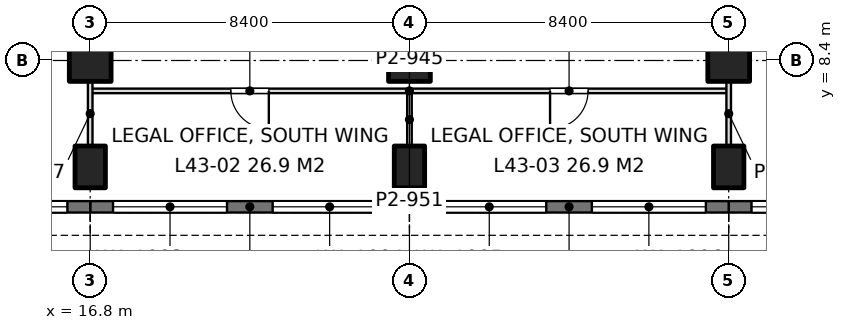
"""IFC4 building model, lengths in metres.
Left out: names, types, materials, properties, quantities, classifications, styles, units other than length and angle.
Written with IfcOpenShell. Run it as: python <this file> out.ifc"""

import sys

from ifc_helpers import new_model, si_unit, direction, frame, frame_2d, origin, origin_2d, place, context, subcontext, project, spatial, rectangle, extrude, element, fill, save


model = new_model("IFC4")
c1 = context("Model", 3, precision=1e-05, world=origin(), true_north=direction((0.0, 1.0)))
c2 = subcontext(c1, "Body", "Model", "MODEL_VIEW")
j1 = project(units=[si_unit("LENGTHUNIT", "METRE"), si_unit("PLANEANGLEUNIT", "RADIAN")], contexts=[c1])
p1 = place(None, origin())
s1 = spatial("IfcSite", under=j1, at=p1, CompositionType="ELEMENT")
p2 = place(p1, origin())
s2 = spatial("IfcBuilding", under=s1, at=p2, CompositionType="ELEMENT")
p3 = place(p2, frame((0.0, 0.0, 190.2)))
s3 = spatial("IfcBuildingStorey", under=s2, at=p3, CompositionType="ELEMENT", Elevation=190.2)
p4 = place(p3, frame((16.8, 5.6, 0.0), z_axis=(0.0, 0.0, 1.0), x_axis=(1.0, 0.0, 0.0)))
e1 = element("IfcColumn", 1, at=p4, inside=s3, PredefinedType="COLUMN", context=c2, shape_type="SweptSolid", body=[
    extrude(rectangle(XDim=0.8, YDim=1.1, at=origin_2d()), origin(), (0.0, 0.0, 1.0), 4.2),
])
p5 = place(p3, frame((16.8, 8.4, 0.0), z_axis=(0.0, 0.0, 1.0), x_axis=(1.0, 0.0, 0.0)))
e2 = element("IfcColumn", 2, at=p5, inside=s3, PredefinedType="COLUMN", context=c2, shape_type="SweptSolid", body=[
    extrude(rectangle(XDim=1.1, YDim=1.1, at=origin_2d()), origin(), (0.0, 0.0, 1.0), 4.2),
])
p6 = place(p3, frame((25.2, 5.6, 0.0), z_axis=(0.0, 0.0, 1.0), x_axis=(1.0, 0.0, 0.0)))
e3 = element("IfcColumn", 3, at=p6, inside=s3, PredefinedType="COLUMN", context=c2, shape_type="SweptSolid", body=[
    extrude(rectangle(XDim=0.8, YDim=1.1, at=origin_2d()), origin(), (0.0, 0.0, 1.0), 4.2),
])
p7 = place(p3, frame((25.2, 8.4, 0.0), z_axis=(0.0, 0.0, 1.0), x_axis=(1.0, 0.0, 0.0)))
e4 = element("IfcColumn", 4, at=p7, inside=s3, PredefinedType="COLUMN", context=c2, shape_type="SweptSolid", body=[
    extrude(rectangle(XDim=1.1, YDim=1.1, at=origin_2d()), origin(), (0.0, 0.0, 1.0), 4.2),
])
p8 = place(p3, frame((33.6, 5.6, 0.0), z_axis=(0.0, 0.0, 1.0), x_axis=(1.0, 0.0, 0.0)))
e5 = element("IfcColumn", 5, at=p8, inside=s3, PredefinedType="COLUMN", context=c2, shape_type="SweptSolid", body=[
    extrude(rectangle(XDim=0.8, YDim=1.1, at=origin_2d()), origin(), (0.0, 0.0, 1.0), 4.2),
])
p9 = place(p3, frame((33.6, 8.4, 0.0), z_axis=(0.0, 0.0, 1.0), x_axis=(1.0, 0.0, 0.0)))
e6 = element("IfcColumn", 6, at=p9, inside=s3, PredefinedType="COLUMN", context=c2, shape_type="SweptSolid", body=[
    extrude(rectangle(XDim=1.1, YDim=1.1, at=origin_2d()), origin(), (0.0, 0.0, 1.0), 4.2),
])
p10 = place(p3, frame((42.0, 4.55, 0.0), z_axis=(0.0, 0.0, 1.0), x_axis=(-1.0, 0.0, 0.0)))
e7 = element("IfcWall", 7, at=p10, inside=s3, PredefinedType="SOLIDWALL", context=c2, shape_type="SweptSolid", body=[
    extrude(rectangle(XDim=8.4, YDim=0.3, at=frame_2d((4.2, 0.0))), origin(), (0.0, 0.0, 1.0), 4.05),
])
p11 = place(p10, frame((0.6, 0.0, 0.9)))
e8 = element("IfcOpeningElement", 8, at=p11, cuts=e7, PredefinedType="OPENING", context=c2, shape_type="SweptSolid", body=[
    extrude(rectangle(XDim=3.0, YDim=1.9, at=frame_2d((1.5, 0.95))), frame((0.0, 0.16, 0.0), z_axis=(0.0, -1.0, 0.0), x_axis=(1.0, 0.0, 0.0)), (0.0, 0.0, 1.0), 0.32),
])
p12 = place(p10, frame((4.8, 0.0, 0.9)))
e9 = element("IfcOpeningElement", 9, at=p12, cuts=e7, PredefinedType="OPENING", context=c2, shape_type="SweptSolid", body=[
    extrude(rectangle(XDim=3.0, YDim=1.9, at=frame_2d((1.5, 0.95))), frame((0.0, 0.16, 0.0), z_axis=(0.0, -1.0, 0.0), x_axis=(1.0, 0.0, 0.0)), (0.0, 0.0, 1.0), 0.32),
])
p13 = place(p3, frame((33.6, 4.55, 0.0), z_axis=(0.0, 0.0, 1.0), x_axis=(-1.0, 0.0, 0.0)))
e10 = element("IfcWall", 10, at=p13, inside=s3, PredefinedType="SOLIDWALL", context=c2, shape_type="SweptSolid", body=[
    extrude(rectangle(XDim=8.4, YDim=0.3, at=frame_2d((4.2, 0.0))), origin(), (0.0, 0.0, 1.0), 4.05),
])
p14 = place(p13, frame((0.6, 0.0, 0.9)))
e11 = element("IfcOpeningElement", 11, at=p14, cuts=e10, PredefinedType="OPENING", context=c2, shape_type="SweptSolid", body=[
    extrude(rectangle(XDim=3.0, YDim=1.9, at=frame_2d((1.5, 0.95))), frame((0.0, 0.16, 0.0), z_axis=(0.0, -1.0, 0.0), x_axis=(1.0, 0.0, 0.0)), (0.0, 0.0, 1.0), 0.32),
])
p15 = place(p13, frame((4.8, 0.0, 0.9)))
e12 = element("IfcOpeningElement", 12, at=p15, cuts=e10, PredefinedType="OPENING", context=c2, shape_type="SweptSolid", body=[
    extrude(rectangle(XDim=3.0, YDim=1.9, at=frame_2d((1.5, 0.95))), frame((0.0, 0.16, 0.0), z_axis=(0.0, -1.0, 0.0), x_axis=(1.0, 0.0, 0.0)), (0.0, 0.0, 1.0), 0.32),
])
p16 = place(p3, frame((25.2, 4.55, 0.0), z_axis=(0.0, 0.0, 1.0), x_axis=(-1.0, 0.0, 0.0)))
e13 = element("IfcWall", 13, at=p16, inside=s3, PredefinedType="SOLIDWALL", context=c2, shape_type="SweptSolid", body=[
    extrude(rectangle(XDim=8.4, YDim=0.3, at=frame_2d((4.2, 0.0))), origin(), (0.0, 0.0, 1.0), 4.05),
])
p17 = place(p16, frame((0.6, 0.0, 0.9)))
e14 = element("IfcOpeningElement", 14, at=p17, cuts=e13, PredefinedType="OPENING", context=c2, shape_type="SweptSolid", body=[
    extrude(rectangle(XDim=3.0, YDim=1.9, at=frame_2d((1.5, 0.95))), frame((0.0, 0.16, 0.0), z_axis=(0.0, -1.0, 0.0), x_axis=(1.0, 0.0, 0.0)), (0.0, 0.0, 1.0), 0.32),
])
p18 = place(p16, frame((4.8, 0.0, 0.9)))
e15 = element("IfcOpeningElement", 15, at=p18, cuts=e13, PredefinedType="OPENING", context=c2, shape_type="SweptSolid", body=[
    extrude(rectangle(XDim=3.0, YDim=1.9, at=frame_2d((1.5, 0.95))), frame((0.0, 0.16, 0.0), z_axis=(0.0, -1.0, 0.0), x_axis=(1.0, 0.0, 0.0)), (0.0, 0.0, 1.0), 0.32),
])
p19 = place(p3, frame((16.8, 4.55, 0.0), z_axis=(0.0, 0.0, 1.0), x_axis=(-1.0, 0.0, 0.0)))
e16 = element("IfcWall", 16, at=p19, inside=s3, PredefinedType="SOLIDWALL", context=c2, shape_type="SweptSolid", body=[
    extrude(rectangle(XDim=8.4, YDim=0.3, at=frame_2d((4.2, 0.0))), origin(), (0.0, 0.0, 1.0), 4.05),
])
p20 = place(p19, frame((0.6, 0.0, 0.9)))
e17 = element("IfcOpeningElement", 17, at=p20, cuts=e16, PredefinedType="OPENING", context=c2, shape_type="SweptSolid", body=[
    extrude(rectangle(XDim=3.0, YDim=1.9, at=frame_2d((1.5, 0.95))), frame((0.0, 0.16, 0.0), z_axis=(0.0, -1.0, 0.0), x_axis=(1.0, 0.0, 0.0)), (0.0, 0.0, 1.0), 0.32),
])
p21 = place(p19, frame((4.8, 0.0, 0.9)))
e18 = element("IfcOpeningElement", 18, at=p21, cuts=e16, PredefinedType="OPENING", context=c2, shape_type="SweptSolid", body=[
    extrude(rectangle(XDim=3.0, YDim=1.9, at=frame_2d((1.5, 0.95))), frame((0.0, 0.16, 0.0), z_axis=(0.0, -1.0, 0.0), x_axis=(1.0, 0.0, 0.0)), (0.0, 0.0, 1.0), 0.32),
])
p22 = place(p3, frame((16.8, 7.6, 0.0), z_axis=(0.0, 0.0, 1.0), x_axis=(1.0, 0.0, 0.0)))
e19 = element("IfcWall", 19, at=p22, inside=s3, PredefinedType="PARTITIONING", context=c2, shape_type="SweptSolid", body=[
    extrude(rectangle(XDim=16.8, YDim=0.12, at=frame_2d((8.4, 0.0))), origin(), (0.0, 0.0, 1.0), 3.69),
])
p23 = place(p22, frame((3.7, 0.0, 0.0)))
e20 = element("IfcOpeningElement", 20, at=p23, cuts=e19, PredefinedType="OPENING", context=c2, shape_type="SweptSolid", body=[
    extrude(rectangle(XDim=1.0, YDim=2.4, at=frame_2d((0.5, 1.2))), frame((0.0, 0.07, 0.0), z_axis=(0.0, -1.0, 0.0), x_axis=(1.0, 0.0, 0.0)), (0.0, 0.0, 1.0), 0.14),
])
p24 = place(p22, frame((12.1, 0.0, 0.0)))
e21 = element("IfcOpeningElement", 21, at=p24, cuts=e19, PredefinedType="OPENING", context=c2, shape_type="SweptSolid", body=[
    extrude(rectangle(XDim=1.0, YDim=2.4, at=frame_2d((0.5, 1.2))), frame((0.0, 0.07, 0.0), z_axis=(0.0, -1.0, 0.0), x_axis=(1.0, 0.0, 0.0)), (0.0, 0.0, 1.0), 0.14),
])
p25 = place(p3, frame((16.8, 6.149, 0.0), z_axis=(0.0, 0.0, 1.0), x_axis=(0.0, 1.0, 0.0)))
e22 = element("IfcWall", 22, at=p25, inside=s3, PredefinedType="PARTITIONING", context=c2, shape_type="SweptSolid", body=[
    extrude(rectangle(XDim=1.703, YDim=0.12, at=frame_2d((0.852, 0.0))), origin(), (0.0, 0.0, 1.0), 3.69),
])
p26 = place(p3, frame((25.2, 6.149, 0.0), z_axis=(0.0, 0.0, 1.0), x_axis=(0.0, 1.0, 0.0)))
e23 = element("IfcWall", 23, at=p26, inside=s3, PredefinedType="PARTITIONING", context=c2, shape_type="SweptSolid", body=[
    extrude(rectangle(XDim=1.393, YDim=0.12, at=frame_2d((0.697, 0.0))), origin(), (0.0, 0.0, 1.0), 3.69),
])
p27 = place(p3, frame((33.6, 6.149, 0.0), z_axis=(0.0, 0.0, 1.0), x_axis=(0.0, 1.0, 0.0)))
e24 = element("IfcWall", 24, at=p27, inside=s3, PredefinedType="PARTITIONING", context=c2, shape_type="SweptSolid", body=[
    extrude(rectangle(XDim=1.703, YDim=0.12, at=frame_2d((0.852, 0.0))), origin(), (0.0, 0.0, 1.0), 3.69),
])
p28 = place(p12, origin())
e25 = element("IfcWindow", 25, at=p28, inside=s3, PartitioningType="SINGLE_PANEL", PredefinedType="WINDOW", context=c2, shape_type="SweptSolid", body=[
    extrude(rectangle(XDim=3.0, YDim=1.9, at=frame_2d((1.5, 0.95))), frame((0.0, 0.03, 0.0), z_axis=(0.0, -1.0, 0.0), x_axis=(1.0, 0.0, 0.0)), (0.0, 0.0, 1.0), 0.06),
])
fill(e9, e25)
p29 = place(p14, origin())
e26 = element("IfcWindow", 26, at=p29, inside=s3, PartitioningType="SINGLE_PANEL", PredefinedType="WINDOW", context=c2, shape_type="SweptSolid", body=[
    extrude(rectangle(XDim=3.0, YDim=1.9, at=frame_2d((1.5, 0.95))), frame((0.0, 0.03, 0.0), z_axis=(0.0, -1.0, 0.0), x_axis=(1.0, 0.0, 0.0)), (0.0, 0.0, 1.0), 0.06),
])
fill(e11, e26)
p30 = place(p15, origin())
e27 = element("IfcWindow", 27, at=p30, inside=s3, PartitioningType="SINGLE_PANEL", PredefinedType="WINDOW", context=c2, shape_type="SweptSolid", body=[
    extrude(rectangle(XDim=3.0, YDim=1.9, at=frame_2d((1.5, 0.95))), frame((0.0, 0.03, 0.0), z_axis=(0.0, -1.0, 0.0), x_axis=(1.0, 0.0, 0.0)), (0.0, 0.0, 1.0), 0.06),
])
fill(e12, e27)
p31 = place(p17, origin())
e28 = element("IfcWindow", 28, at=p31, inside=s3, PartitioningType="SINGLE_PANEL", PredefinedType="WINDOW", context=c2, shape_type="SweptSolid", body=[
    extrude(rectangle(XDim=3.0, YDim=1.9, at=frame_2d((1.5, 0.95))), frame((0.0, 0.03, 0.0), z_axis=(0.0, -1.0, 0.0), x_axis=(1.0, 0.0, 0.0)), (0.0, 0.0, 1.0), 0.06),
])
fill(e14, e28)
p32 = place(p18, origin())
e29 = element("IfcWindow", 29, at=p32, inside=s3, PartitioningType="SINGLE_PANEL", PredefinedType="WINDOW", context=c2, shape_type="SweptSolid", body=[
    extrude(rectangle(XDim=3.0, YDim=1.9, at=frame_2d((1.5, 0.95))), frame((0.0, 0.03, 0.0), z_axis=(0.0, -1.0, 0.0), x_axis=(1.0, 0.0, 0.0)), (0.0, 0.0, 1.0), 0.06),
])
fill(e15, e29)
p33 = place(p20, origin())
e30 = element("IfcWindow", 30, at=p33, inside=s3, PartitioningType="SINGLE_PANEL", PredefinedType="WINDOW", context=c2, shape_type="SweptSolid", body=[
    extrude(rectangle(XDim=3.0, YDim=1.9, at=frame_2d((1.5, 0.95))), frame((0.0, 0.03, 0.0), z_axis=(0.0, -1.0, 0.0), x_axis=(1.0, 0.0, 0.0)), (0.0, 0.0, 1.0), 0.06),
])
fill(e17, e30)
p34 = place(p23, frame((1.0, 0.0, 0.0), z_axis=(0.0, 0.0, 1.0), x_axis=(-1.0, 0.0, 0.0)))
e31 = element("IfcDoor", 31, at=p34, inside=s3, OperationType="SINGLE_SWING_LEFT", PredefinedType="DOOR", context=c2, shape_type="SweptSolid", body=[
    extrude(rectangle(XDim=1.0, YDim=2.4, at=frame_2d((0.5, 1.2))), frame((0.0, 0.025, 0.0), z_axis=(0.0, -1.0, 0.0), x_axis=(1.0, 0.0, 0.0)), (0.0, 0.0, 1.0), 0.05),
])
fill(e20, e31)
p35 = place(p24, frame((1.0, 0.0, 0.0), z_axis=(0.0, 0.0, 1.0), x_axis=(-1.0, 0.0, 0.0)))
e32 = element("IfcDoor", 32, at=p35, inside=s3, OperationType="SINGLE_SWING_RIGHT", PredefinedType="DOOR", context=c2, shape_type="SweptSolid", body=[
    extrude(rectangle(XDim=1.0, YDim=2.4, at=frame_2d((0.5, 1.2))), frame((0.0, 0.025, 0.0), z_axis=(0.0, -1.0, 0.0), x_axis=(1.0, 0.0, 0.0)), (0.0, 0.0, 1.0), 0.05),
])
fill(e21, e32)
save(model, sys.argv[1])
